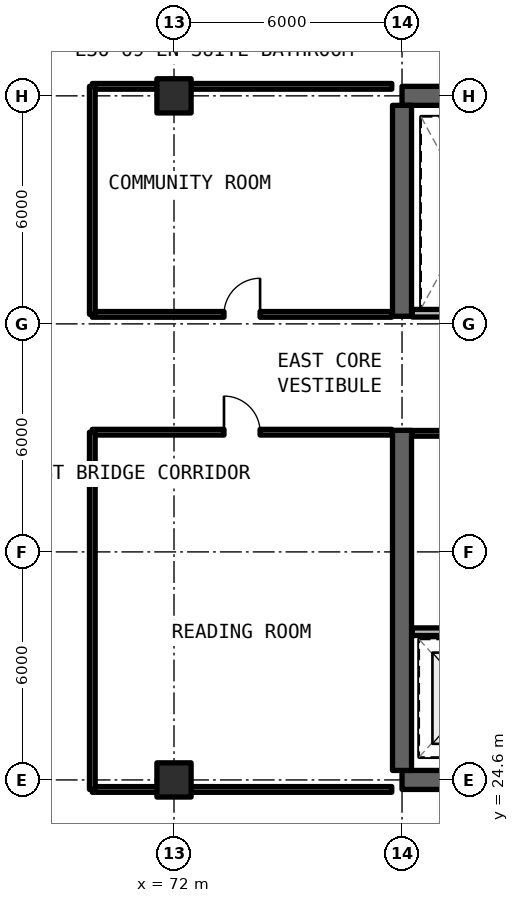
"""IFC4 building model, lengths in metres.
Left out: names, types, materials, properties, quantities, classifications, styles, units other than length and angle.
Written with IfcOpenShell. Run it as: python <this file> out.ifc"""

import sys

from ifc_helpers import new_model, si_unit, direction, frame, frame_2d, origin, origin_2d, place, context, subcontext, project, spatial, rectangle, extrude, element, fill, save


model = new_model("IFC4")
c1 = context("Model", 3, precision=1e-05, world=origin(), true_north=direction((0.0, 1.0)))
c2 = subcontext(c1, "Body", "Model", "MODEL_VIEW")
j1 = project(units=[si_unit("LENGTHUNIT", "METRE"), si_unit("PLANEANGLEUNIT", "RADIAN")], contexts=[c1])
p1 = place(None, origin())
s1 = spatial("IfcSite", under=j1, at=p1, CompositionType="ELEMENT")
p2 = place(p1, origin())
s2 = spatial("IfcBuilding", under=s1, at=p2, CompositionType="ELEMENT")
p3 = place(p2, frame((0.0, 0.0, 132.0)))
s3 = spatial("IfcBuildingStorey", under=s2, at=p3, CompositionType="ELEMENT", Elevation=132.0)
for number, where, z_axis, x_axis in (
    (1, (78.0, 24.6, 0.0), (0.0, 0.0, 1.0), (1.0, 0.0, 0.0)),
    (2, (90.0, 42.6, 0.0), (0.0, 0.0, 1.0), (-1.0, 0.0, 0.0)),
):
    element("IfcWall", number, at=place(p3, frame(where, z_axis=z_axis, x_axis=x_axis)), inside=s3, PredefinedType="SHEAR", context=c2, shape_type="SweptSolid", body=[
        extrude(rectangle(XDim=12.0, YDim=0.5, at=frame_2d((6.0, 0.0))), origin(), (0.0, 0.0, 1.0), 3.3),
    ])
p4 = place(p3, frame((78.0, 24.85, 0.0), z_axis=(0.0, 0.0, 1.0), x_axis=(0.0, 1.0, 0.0)))
e3 = element("IfcWall", 3, at=p4, inside=s3, PredefinedType="SHEAR", context=c2, shape_type="SweptSolid", body=[
    extrude(rectangle(XDim=8.95, YDim=0.5, at=frame_2d((4.475, 0.0))), origin(), (0.0, 0.0, 1.0), 3.3),
])
p5 = place(p3, frame((78.0, 36.8, 0.0), z_axis=(0.0, 0.0, 1.0), x_axis=(0.0, 1.0, 0.0)))
e4 = element("IfcWall", 4, at=p5, inside=s3, PredefinedType="SHEAR", context=c2, shape_type="SweptSolid", body=[
    extrude(rectangle(XDim=5.55, YDim=0.5, at=frame_2d((2.775, 0.0))), origin(), (0.0, 0.0, 1.0), 3.3),
])
for number, where, z_axis, x_axis in (
    (5, (72.0, 24.6, 0.0), (0.0, 0.0, 1.0), (1.0, 0.0, 0.0)),
    (6, (72.0, 42.6, 0.0), (0.0, 0.0, 1.0), (1.0, 0.0, 0.0)),
):
    element("IfcColumn", number, at=place(p3, frame(where, z_axis=z_axis, x_axis=x_axis)), inside=s3, PredefinedType="COLUMN", context=c2, shape_type="SweptSolid", body=[
        extrude(rectangle(XDim=0.9, YDim=0.9, at=origin_2d()), origin(), (0.0, 0.0, 1.0), 3.3),
    ])
p6 = place(p3, frame((78.27, 28.5, 0.0), z_axis=(0.0, 0.0, 1.0), x_axis=(1.0, 0.0, 0.0)))
e7 = element("IfcWall", 7, at=p6, inside=s3, PredefinedType="SOLIDWALL", context=c2, shape_type="SweptSolid", body=[
    extrude(rectangle(XDim=7.51, YDim=0.2, at=frame_2d((3.755, 0.0))), origin(), (0.0, 0.0, 1.0), 2.35),
])
p7 = place(p6, frame((3.53, 0.0, 0.0)))
e8 = element("IfcOpeningElement", 8, at=p7, cuts=e7, PredefinedType="OPENING", context=c2, shape_type="SweptSolid", body=[
    extrude(rectangle(XDim=1.0, YDim=2.15, at=frame_2d((0.5, 1.075))), frame((0.0, 0.11, 0.0), z_axis=(0.0, -1.0, 0.0), x_axis=(1.0, 0.0, 0.0)), (0.0, 0.0, 1.0), 0.22),
])
p8 = place(p3, frame((78.27, 33.72, 0.0), z_axis=(0.0, 0.0, 1.0), x_axis=(1.0, 0.0, 0.0)))
e9 = element("IfcWall", 9, at=p8, inside=s3, PredefinedType="SOLIDWALL", context=c2, shape_type="SweptSolid", body=[
    extrude(rectangle(XDim=3.05, YDim=0.15, at=frame_2d((1.525, 0.0))), origin(), (0.0, 0.0, 1.0), 2.35),
])
p9 = place(p3, frame((78.27, 36.88, 0.0), z_axis=(0.0, 0.0, 1.0), x_axis=(1.0, 0.0, 0.0)))
e10 = element("IfcWall", 10, at=p9, inside=s3, PredefinedType="SOLIDWALL", context=c2, shape_type="SweptSolid", body=[
    extrude(rectangle(XDim=3.05, YDim=0.2, at=frame_2d((1.525, 0.0))), origin(), (0.0, 0.0, 1.0), 2.35),
])
p10 = place(p3, frame((69.85, 24.35, 0.0), z_axis=(0.0, 0.0, 1.0), x_axis=(1.0, 0.0, 0.0)))
e11 = element("IfcWall", 11, at=p10, inside=s3, PredefinedType="SOLIDWALL", context=c2, shape_type="SweptSolid", body=[
    extrude(rectangle(XDim=7.88, YDim=0.15, at=frame_2d((3.94, 0.0))), origin(), (0.0, 0.0, 1.0), 2.35),
])
p11 = place(p3, frame((69.85, 33.75, 0.0), z_axis=(0.0, 0.0, 1.0), x_axis=(1.0, 0.0, 0.0)))
e12 = element("IfcWall", 12, at=p11, inside=s3, PredefinedType="SOLIDWALL", context=c2, shape_type="SweptSolid", body=[
    extrude(rectangle(XDim=7.88, YDim=0.15, at=frame_2d((3.94, 0.0))), origin(), (0.0, 0.0, 1.0), 2.35),
])
p12 = place(p11, frame((3.465, 0.0, 0.0)))
e13 = element("IfcOpeningElement", 13, at=p12, cuts=e12, PredefinedType="OPENING", context=c2, shape_type="SweptSolid", body=[
    extrude(rectangle(XDim=0.95, YDim=2.15, at=frame_2d((0.475, 1.075))), frame((0.0, 0.085, 0.0), z_axis=(0.0, -1.0, 0.0), x_axis=(1.0, 0.0, 0.0)), (0.0, 0.0, 1.0), 0.17),
])
p13 = place(p3, frame((69.85, 24.35, 0.0), z_axis=(0.0, 0.0, 1.0), x_axis=(0.0, 1.0, 0.0)))
e14 = element("IfcWall", 14, at=p13, inside=s3, PredefinedType="SOLIDWALL", context=c2, shape_type="SweptSolid", body=[
    extrude(rectangle(XDim=9.4, YDim=0.15, at=frame_2d((4.7, 0.0))), origin(), (0.0, 0.0, 1.0), 2.35),
])
p14 = place(p3, frame((69.85, 36.85, 0.0), z_axis=(0.0, 0.0, 1.0), x_axis=(1.0, 0.0, 0.0)))
e15 = element("IfcWall", 15, at=p14, inside=s3, PredefinedType="SOLIDWALL", context=c2, shape_type="SweptSolid", body=[
    extrude(rectangle(XDim=7.88, YDim=0.15, at=frame_2d((3.94, 0.0))), origin(), (0.0, 0.0, 1.0), 2.35),
])
p15 = place(p14, frame((3.465, 0.0, 0.0)))
e16 = element("IfcOpeningElement", 16, at=p15, cuts=e15, PredefinedType="OPENING", context=c2, shape_type="SweptSolid", body=[
    extrude(rectangle(XDim=0.95, YDim=2.15, at=frame_2d((0.475, 1.075))), frame((0.0, 0.085, 0.0), z_axis=(0.0, -1.0, 0.0), x_axis=(1.0, 0.0, 0.0)), (0.0, 0.0, 1.0), 0.17),
])
p16 = place(p3, frame((69.85, 42.85, 0.0), z_axis=(0.0, 0.0, 1.0), x_axis=(1.0, 0.0, 0.0)))
e17 = element("IfcWall", 17, at=p16, inside=s3, PredefinedType="SOLIDWALL", context=c2, shape_type="SweptSolid", body=[
    extrude(rectangle(XDim=7.88, YDim=0.15, at=frame_2d((3.94, 0.0))), origin(), (0.0, 0.0, 1.0), 2.35),
])
p17 = place(p3, frame((69.85, 36.85, 0.0), z_axis=(0.0, 0.0, 1.0), x_axis=(0.0, 1.0, 0.0)))
e18 = element("IfcWall", 18, at=p17, inside=s3, PredefinedType="SOLIDWALL", context=c2, shape_type="SweptSolid", body=[
    extrude(rectangle(XDim=6.0, YDim=0.15, at=frame_2d((3.0, 0.0))), origin(), (0.0, 0.0, 1.0), 2.35),
])
p18 = place(p12, origin())
e19 = element("IfcDoor", 19, at=p18, inside=s3, OperationType="SINGLE_SWING_LEFT", PredefinedType="DOOR", context=c2, shape_type="SweptSolid", body=[
    extrude(rectangle(XDim=0.95, YDim=2.15, at=frame_2d((0.475, 1.075))), frame((0.0, 0.025, 0.0), z_axis=(0.0, -1.0, 0.0), x_axis=(1.0, 0.0, 0.0)), (0.0, 0.0, 1.0), 0.05),
])
fill(e13, e19)
p19 = place(p15, origin())
e20 = element("IfcDoor", 20, at=p19, inside=s3, OperationType="SINGLE_SWING_RIGHT", PredefinedType="DOOR", context=c2, shape_type="SweptSolid", body=[
    extrude(rectangle(XDim=0.95, YDim=2.15, at=frame_2d((0.475, 1.075))), frame((0.0, 0.025, 0.0), z_axis=(0.0, -1.0, 0.0), x_axis=(1.0, 0.0, 0.0)), (0.0, 0.0, 1.0), 0.05),
])
fill(e16, e20)
save(model, sys.argv[1])
